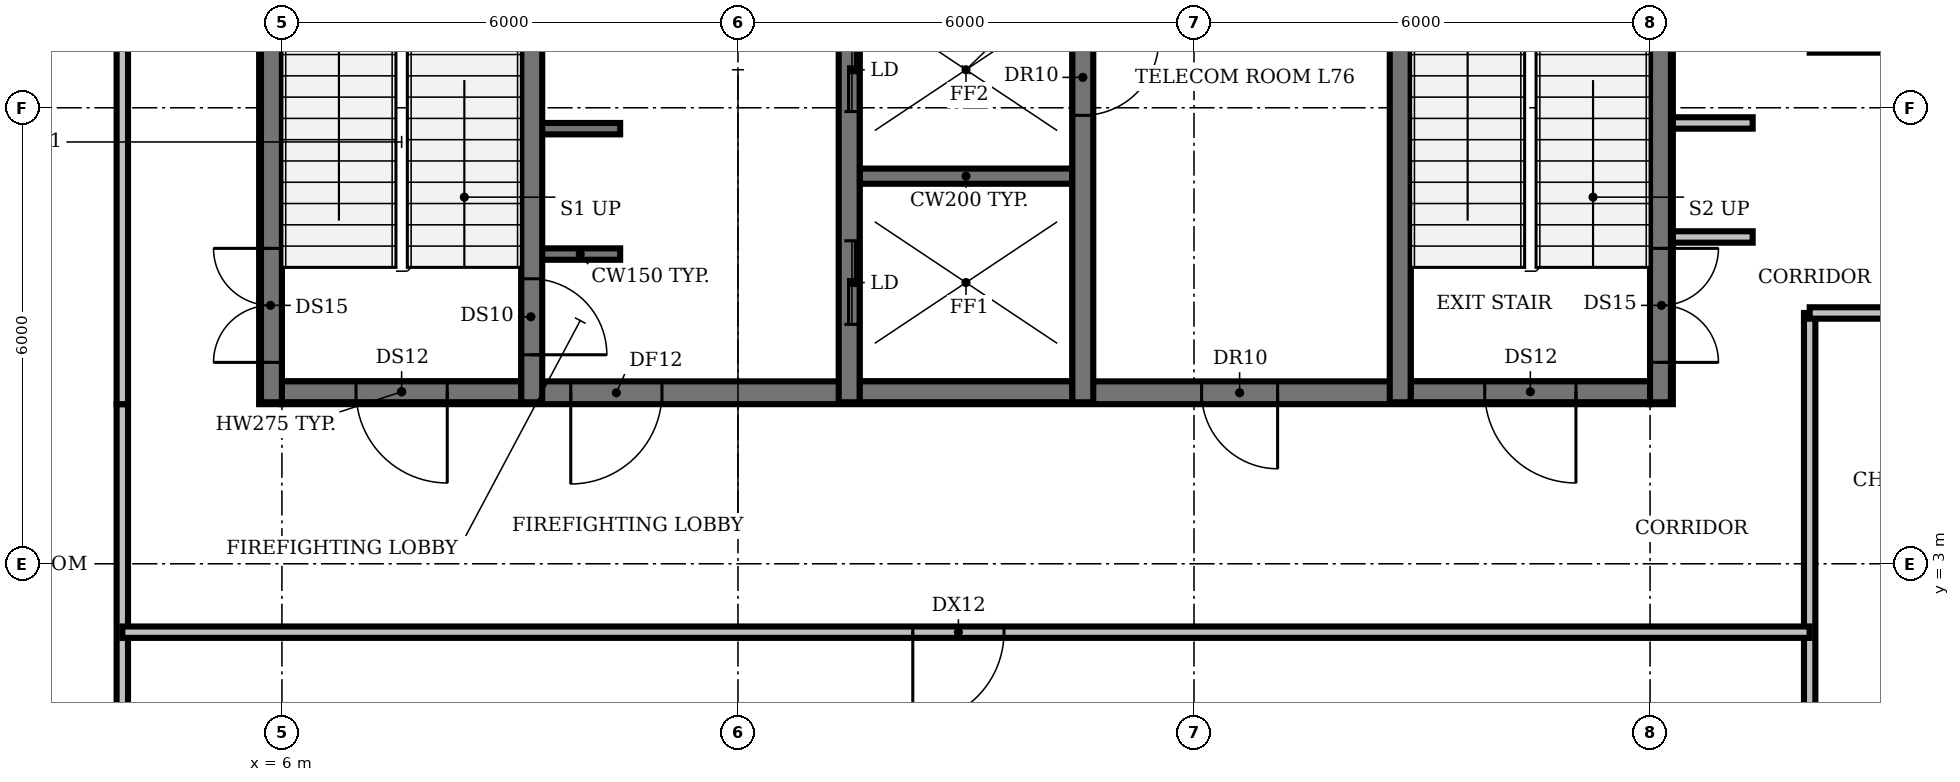
"""IFC4 building model, lengths in metres.
Left out: names, types, materials, properties, quantities, classifications, styles, units other than length and angle.
Written with IfcOpenShell. Run it as: python <this file> out.ifc"""

import sys

from ifc_helpers import new_model, si_unit, direction, frame, frame_2d, origin, place, context, subcontext, project, spatial, rectangle, extrude, element, fill, save


model = new_model("IFC4")
c1 = context("Model", 3, precision=1e-05, world=origin(), true_north=direction((0.0, 1.0)))
c2 = subcontext(c1, "Body", "Model", "MODEL_VIEW")
j1 = project(units=[si_unit("LENGTHUNIT", "METRE"), si_unit("PLANEANGLEUNIT", "RADIAN")], contexts=[c1])
p1 = place(None, origin())
s1 = spatial("IfcSite", under=j1, at=p1, CompositionType="ELEMENT")
p2 = place(p1, origin())
s2 = spatial("IfcBuilding", under=s1, at=p2, CompositionType="ELEMENT")
p3 = place(p2, frame((0.0, 0.0, 339.8)))
s3 = spatial("IfcBuildingStorey", under=s2, at=p3, CompositionType="ELEMENT", Elevation=339.8)
p4 = place(p3, frame((9.4, 7.075, 0.0), z_axis=(0.0, 0.0, 1.0), x_axis=(1.0, 0.0, 0.0)))
e1 = element("IfcWall", 1, at=p4, inside=s3, PredefinedType="SHEAR", context=c2, shape_type="SweptSolid", body=[
    extrude(rectangle(XDim=1.05, YDim=0.15, at=frame_2d((0.525, 0.0))), origin(), (0.0, 0.0, 1.0), 3.9),
])
p5 = place(p3, frame((13.6, 8.1, 0.0), z_axis=(0.0, 0.0, 1.0), x_axis=(1.0, 0.0, 0.0)))
e2 = element("IfcWall", 2, at=p5, inside=s3, PredefinedType="SHEAR", context=c2, shape_type="SweptSolid", body=[
    extrude(rectangle(XDim=2.8, YDim=0.2, at=frame_2d((1.4, 0.0))), origin(), (0.0, 0.0, 1.0), 3.9),
])
p6 = place(p3, frame((9.4, 8.725, 0.0), z_axis=(0.0, 0.0, 1.0), x_axis=(1.0, 0.0, 0.0)))
e3 = element("IfcWall", 3, at=p6, inside=s3, PredefinedType="SHEAR", context=c2, shape_type="SweptSolid", body=[
    extrude(rectangle(XDim=1.05, YDim=0.15, at=frame_2d((0.525, 0.0))), origin(), (0.0, 0.0, 1.0), 3.9),
])
p7 = place(p3, frame((9.275, 11.825, 0.0), z_axis=(0.0, 0.0, 1.0), x_axis=(0.0, -1.0, 0.0)))
e4 = element("IfcWall", 4, at=p7, inside=s3, PredefinedType="SHEAR", context=c2, shape_type="SweptSolid", body=[
    extrude(rectangle(XDim=6.425, YDim=0.25, at=frame_2d((3.212, 0.0))), origin(), (0.0, 0.0, 1.0), 3.9),
])
p8 = place(p7, frame((5.075, 0.0, 0.0)))
e5 = element("IfcOpeningElement", 5, at=p8, cuts=e4, PredefinedType="OPENING", context=c2, shape_type="SweptSolid", body=[
    extrude(rectangle(XDim=1.0, YDim=2.1, at=frame_2d((0.5, 1.05))), frame((0.0, 0.135, 0.0), z_axis=(0.0, -1.0, 0.0), x_axis=(1.0, 0.0, 0.0)), (0.0, 0.0, 1.0), 0.27),
])
p9 = place(p3, frame((13.5, 5.4, 0.0), z_axis=(0.0, 0.0, 1.0), x_axis=(0.0, 1.0, 0.0)))
e6 = element("IfcWall", 6, at=p9, inside=s3, PredefinedType="SHEAR", context=c2, shape_type="SweptSolid", body=[
    extrude(rectangle(XDim=8.2, YDim=0.2, at=frame_2d((4.1, 0.0))), origin(), (0.0, 0.0, 1.0), 3.9),
])
p10 = place(p9, frame((0.75, 0.0, 0.0)))
e7 = element("IfcOpeningElement", 7, at=p10, cuts=e6, PredefinedType="OPENING", context=c2, shape_type="SweptSolid", body=[
    extrude(rectangle(XDim=1.1, YDim=2.1, at=frame_2d((0.55, 1.05))), frame((0.0, 0.11, 0.0), z_axis=(0.0, -1.0, 0.0), x_axis=(1.0, 0.0, 0.0)), (0.0, 0.0, 1.0), 0.22),
])
p11 = place(p9, frame((3.55, 0.0, 0.0)))
e8 = element("IfcOpeningElement", 8, at=p11, cuts=e6, PredefinedType="OPENING", context=c2, shape_type="SweptSolid", body=[
    extrude(rectangle(XDim=1.1, YDim=2.1, at=frame_2d((0.55, 1.05))), frame((0.0, 0.11, 0.0), z_axis=(0.0, -1.0, 0.0), x_axis=(1.0, 0.0, 0.0)), (0.0, 0.0, 1.0), 0.22),
])
p12 = place(p9, frame((6.35, 0.0, 0.0)))
e9 = element("IfcOpeningElement", 9, at=p12, cuts=e6, PredefinedType="OPENING", context=c2, shape_type="SweptSolid", body=[
    extrude(rectangle(XDim=1.1, YDim=2.1, at=frame_2d((0.55, 1.05))), frame((0.0, 0.11, 0.0), z_axis=(0.0, -1.0, 0.0), x_axis=(1.0, 0.0, 0.0)), (0.0, 0.0, 1.0), 0.22),
])
p13 = place(p3, frame((16.5, 5.4, 0.0), z_axis=(0.0, 0.0, 1.0), x_axis=(0.0, 1.0, 0.0)))
e10 = element("IfcWall", 10, at=p13, inside=s3, PredefinedType="SHEAR", context=c2, shape_type="SweptSolid", body=[
    extrude(rectangle(XDim=8.2, YDim=0.2, at=frame_2d((4.1, 0.0))), origin(), (0.0, 0.0, 1.0), 3.9),
])
p14 = place(p3, frame((20.725, 5.4, 0.0), z_axis=(0.0, 0.0, 1.0), x_axis=(0.0, 1.0, 0.0)))
e11 = element("IfcWall", 11, at=p14, inside=s3, PredefinedType="SHEAR", context=c2, shape_type="SweptSolid", body=[
    extrude(rectangle(XDim=6.3, YDim=0.25, at=frame_2d((3.15, 0.0))), origin(), (0.0, 0.0, 1.0), 3.9),
])
p15 = place(p3, frame((5.85, 5.1, 0.0), z_axis=(0.0, 0.0, 1.0), x_axis=(0.0, 1.0, 0.0)))
e12 = element("IfcWall", 12, at=p15, inside=s3, PredefinedType="SHEAR", context=c2, shape_type="SweptSolid", body=[
    extrude(rectangle(XDim=20.0, YDim=0.3, at=frame_2d((10.0, 0.0))), origin(), (0.0, 0.0, 1.0), 3.9),
])
p16 = place(p15, frame((0.55, 0.0, 0.0)))
e13 = element("IfcOpeningElement", 13, at=p16, cuts=e12, PredefinedType="OPENING", context=c2, shape_type="SweptSolid", body=[
    extrude(rectangle(XDim=1.5, YDim=2.1, at=frame_2d((0.75, 1.05))), frame((0.0, 0.16, 0.0), z_axis=(0.0, -1.0, 0.0), x_axis=(1.0, 0.0, 0.0)), (0.0, 0.0, 1.0), 0.32),
])
p17 = place(p15, frame((7.0, 0.0, 0.0)))
e14 = element("IfcOpeningElement", 14, at=p17, cuts=e12, PredefinedType="OPENING", context=c2, shape_type="SweptSolid", body=[
    extrude(rectangle(XDim=1.2, YDim=2.1, at=frame_2d((0.6, 1.05))), frame((0.0, 0.16, 0.0), z_axis=(0.0, -1.0, 0.0), x_axis=(1.0, 0.0, 0.0)), (0.0, 0.0, 1.0), 0.32),
])
p18 = place(p15, frame((13.55, 0.0, 0.0)))
e15 = element("IfcOpeningElement", 15, at=p18, cuts=e12, PredefinedType="OPENING", context=c2, shape_type="SweptSolid", body=[
    extrude(rectangle(XDim=1.2, YDim=2.1, at=frame_2d((0.6, 1.05))), frame((0.0, 0.16, 0.0), z_axis=(0.0, -1.0, 0.0), x_axis=(1.0, 0.0, 0.0)), (0.0, 0.0, 1.0), 0.32),
])
p19 = place(p3, frame((24.15, 25.705, 0.0), z_axis=(0.0, 0.0, 1.0), x_axis=(0.0, -1.0, 0.0)))
e16 = element("IfcWall", 16, at=p19, inside=s3, PredefinedType="SHEAR", context=c2, shape_type="SweptSolid", body=[
    extrude(rectangle(XDim=20.605, YDim=0.3, at=frame_2d((10.302, 0.0))), origin(), (0.0, 0.0, 1.0), 3.9),
])
p20 = place(p19, frame((18.555, 0.0, 0.0)))
e17 = element("IfcOpeningElement", 17, at=p20, cuts=e16, PredefinedType="OPENING", context=c2, shape_type="SweptSolid", body=[
    extrude(rectangle(XDim=1.5, YDim=2.1, at=frame_2d((0.75, 1.05))), frame((0.0, 0.16, 0.0), z_axis=(0.0, -1.0, 0.0), x_axis=(1.0, 0.0, 0.0)), (0.0, 0.0, 1.0), 0.32),
])
p21 = place(p19, frame((12.455, 0.0, 0.0)))
e18 = element("IfcOpeningElement", 18, at=p21, cuts=e16, PredefinedType="OPENING", context=c2, shape_type="SweptSolid", body=[
    extrude(rectangle(XDim=0.9, YDim=2.1, at=frame_2d((0.45, 1.05))), frame((0.0, 0.16, 0.0), z_axis=(0.0, -1.0, 0.0), x_axis=(1.0, 0.0, 0.0)), (0.0, 0.0, 1.0), 0.32),
])
p22 = place(p19, frame((6.455, 0.0, 0.0)))
e19 = element("IfcOpeningElement", 19, at=p22, cuts=e16, PredefinedType="OPENING", context=c2, shape_type="SweptSolid", body=[
    extrude(rectangle(XDim=2.0, YDim=2.1, at=frame_2d((1.0, 1.05))), frame((0.0, 0.16, 0.0), z_axis=(0.0, -1.0, 0.0), x_axis=(1.0, 0.0, 0.0)), (0.0, 0.0, 1.0), 0.32),
])
p23 = place(p3, frame((24.0, 5.25, 0.0), z_axis=(0.0, 0.0, 1.0), x_axis=(-1.0, 0.0, 0.0)))
e20 = element("IfcWall", 20, at=p23, inside=s3, PredefinedType="SHEAR", context=c2, shape_type="SweptSolid", body=[
    extrude(rectangle(XDim=18.0, YDim=0.3, at=frame_2d((9.0, 0.0))), origin(), (0.0, 0.0, 1.0), 3.9),
])
p24 = place(p23, frame((13.0, 0.0, 0.0)))
e21 = element("IfcOpeningElement", 21, at=p24, cuts=e20, PredefinedType="OPENING", context=c2, shape_type="SweptSolid", body=[
    extrude(rectangle(XDim=1.2, YDim=2.1, at=frame_2d((0.6, 1.05))), frame((0.0, 0.16, 0.0), z_axis=(0.0, -1.0, 0.0), x_axis=(1.0, 0.0, 0.0)), (0.0, 0.0, 1.0), 0.32),
])
p25 = place(p23, frame((4.9, 0.0, 0.0)))
e22 = element("IfcOpeningElement", 22, at=p25, cuts=e20, PredefinedType="OPENING", context=c2, shape_type="SweptSolid", body=[
    extrude(rectangle(XDim=1.0, YDim=2.1, at=frame_2d((0.5, 1.05))), frame((0.0, 0.16, 0.0), z_axis=(0.0, -1.0, 0.0), x_axis=(1.0, 0.0, 0.0)), (0.0, 0.0, 1.0), 0.32),
])
p26 = place(p3, frame((9.15, 5.263, 4.2), z_axis=(0.0, 0.0, 1.0), x_axis=(-1.0, 0.0, 0.0)))
e23 = element("IfcWall", 23, at=p26, inside=s3, PredefinedType="SHEAR", context=c2, shape_type="SweptSolid", body=[
    extrude(rectangle(XDim=3.15, YDim=0.275, at=frame_2d((1.575, 0.0))), origin(), (0.0, 0.0, 1.0), 3.0),
])
p27 = place(p26, frame((0.975, 0.0, 0.0)))
e24 = element("IfcOpeningElement", 24, at=p27, cuts=e23, PredefinedType="OPENING", context=c2, shape_type="SweptSolid", body=[
    extrude(rectangle(XDim=1.2, YDim=2.1, at=frame_2d((0.6, 1.05))), frame((0.0, 0.147, 0.0), z_axis=(0.0, -1.0, 0.0), x_axis=(1.0, 0.0, 0.0)), (0.0, 0.0, 1.0), 0.295),
])
p28 = place(p3, frame((13.6, 5.263, 4.2), z_axis=(0.0, 0.0, 1.0), x_axis=(1.0, 0.0, 0.0)))
e25 = element("IfcWall", 25, at=p28, inside=s3, PredefinedType="SHEAR", context=c2, shape_type="SweptSolid", body=[
    extrude(rectangle(XDim=2.8, YDim=0.275, at=frame_2d((1.4, 0.0))), origin(), (0.0, 0.0, 1.0), 3.0),
])
p29 = place(p3, frame((24.0, 5.263, 4.2), z_axis=(0.0, 0.0, 1.0), x_axis=(-1.0, 0.0, 0.0)))
e26 = element("IfcWall", 26, at=p29, inside=s3, PredefinedType="SHEAR", context=c2, shape_type="SweptSolid", body=[
    extrude(rectangle(XDim=3.15, YDim=0.275, at=frame_2d((1.575, 0.0))), origin(), (0.0, 0.0, 1.0), 3.0),
])
p30 = place(p29, frame((0.975, 0.0, 0.0)))
e27 = element("IfcOpeningElement", 27, at=p30, cuts=e26, PredefinedType="OPENING", context=c2, shape_type="SweptSolid", body=[
    extrude(rectangle(XDim=1.2, YDim=2.1, at=frame_2d((0.6, 1.05))), frame((0.0, 0.147, 0.0), z_axis=(0.0, -1.0, 0.0), x_axis=(1.0, 0.0, 0.0)), (0.0, 0.0, 1.0), 0.295),
])
p31 = place(p3, frame((5.862, 5.125, 4.2), z_axis=(0.0, 0.0, 1.0), x_axis=(0.0, 1.0, 0.0)))
e28 = element("IfcWall", 28, at=p31, inside=s3, PredefinedType="SHEAR", context=c2, shape_type="SweptSolid", body=[
    extrude(rectangle(XDim=19.95, YDim=0.275, at=frame_2d((9.975, 0.0))), origin(), (0.0, 0.0, 1.0), 3.0),
])
p32 = place(p31, frame((6.975, 0.0, 0.0)))
e29 = element("IfcOpeningElement", 29, at=p32, cuts=e28, PredefinedType="OPENING", context=c2, shape_type="SweptSolid", body=[
    extrude(rectangle(XDim=1.2, YDim=2.1, at=frame_2d((0.6, 1.05))), frame((0.0, 0.147, 0.0), z_axis=(0.0, -1.0, 0.0), x_axis=(1.0, 0.0, 0.0)), (0.0, 0.0, 1.0), 0.295),
])
p33 = place(p31, frame((13.525, 0.0, 0.0)))
e30 = element("IfcOpeningElement", 30, at=p33, cuts=e28, PredefinedType="OPENING", context=c2, shape_type="SweptSolid", body=[
    extrude(rectangle(XDim=1.2, YDim=2.1, at=frame_2d((0.6, 1.05))), frame((0.0, 0.147, 0.0), z_axis=(0.0, -1.0, 0.0), x_axis=(1.0, 0.0, 0.0)), (0.0, 0.0, 1.0), 0.295),
])
p34 = place(p3, frame((9.287, 5.125, 4.2), z_axis=(0.0, 0.0, 1.0), x_axis=(0.0, 1.0, 0.0)))
e31 = element("IfcWall", 31, at=p34, inside=s3, PredefinedType="SHEAR", context=c2, shape_type="SweptSolid", body=[
    extrude(rectangle(XDim=19.95, YDim=0.275, at=frame_2d((9.975, 0.0))), origin(), (0.0, 0.0, 1.0), 3.0),
])
p35 = place(p3, frame((13.463, 5.125, 4.2), z_axis=(0.0, 0.0, 1.0), x_axis=(0.0, 1.0, 0.0)))
e32 = element("IfcWall", 32, at=p35, inside=s3, PredefinedType="SHEAR", context=c2, shape_type="SweptSolid", body=[
    extrude(rectangle(XDim=8.75, YDim=0.275, at=frame_2d((4.375, 0.0))), origin(), (0.0, 0.0, 1.0), 3.0),
])
p36 = place(p3, frame((16.537, 13.875, 4.2), z_axis=(0.0, 0.0, 1.0), x_axis=(0.0, -1.0, 0.0)))
e33 = element("IfcWall", 33, at=p36, inside=s3, PredefinedType="SHEAR", context=c2, shape_type="SweptSolid", body=[
    extrude(rectangle(XDim=8.75, YDim=0.275, at=frame_2d((4.375, 0.0))), origin(), (0.0, 0.0, 1.0), 3.0),
])
p37 = place(p36, frame((3.975, 0.0, 0.0)))
e34 = element("IfcOpeningElement", 34, at=p37, cuts=e33, PredefinedType="OPENING", context=c2, shape_type="SweptSolid", body=[
    extrude(rectangle(XDim=1.0, YDim=2.1, at=frame_2d((0.5, 1.05))), frame((0.0, 0.147, 0.0), z_axis=(0.0, -1.0, 0.0), x_axis=(1.0, 0.0, 0.0)), (0.0, 0.0, 1.0), 0.295),
])
for number, where, z_axis, x_axis in (
    (35, (20.713, 5.125, 4.2), (0.0, 0.0, 1.0), (0.0, 1.0, 0.0)),
    (36, (24.137, 5.125, 4.2), (0.0, 0.0, 1.0), (0.0, 1.0, 0.0)),
):
    element("IfcWall", number, at=place(p3, frame(where, z_axis=z_axis, x_axis=x_axis)), inside=s3, PredefinedType="SHEAR", context=c2, shape_type="SweptSolid", body=[
        extrude(rectangle(XDim=6.85, YDim=0.275, at=frame_2d((3.425, 0.0))), origin(), (0.0, 0.0, 1.0), 3.0),
    ])
p38 = place(p3, frame((3.9, -3.56, 0.0), z_axis=(0.0, 0.0, 1.0), x_axis=(0.0, 1.0, 0.0)))
e37 = element("IfcWall", 37, at=p38, inside=s3, PredefinedType="PARTITIONING", context=c2, shape_type="SweptSolid", body=[
    extrude(rectangle(XDim=8.66, YDim=0.15, at=frame_2d((4.33, 0.0))), origin(), (0.0, 0.0, 1.0), 2.95),
])
p39 = place(p3, frame((3.9, 5.1, 0.0), z_axis=(0.0, 0.0, 1.0), x_axis=(0.0, 1.0, 0.0)))
e38 = element("IfcWall", 38, at=p39, inside=s3, PredefinedType="PARTITIONING", context=c2, shape_type="SweptSolid", body=[
    extrude(rectangle(XDim=13.9, YDim=0.15, at=frame_2d((6.95, 0.0))), origin(), (0.0, 0.0, 1.0), 2.95),
])
p40 = place(p39, frame((6.2, 0.0, 0.0)))
e39 = element("IfcOpeningElement", 39, at=p40, cuts=e38, PredefinedType="OPENING", context=c2, shape_type="SweptSolid", body=[
    extrude(rectangle(XDim=1.2, YDim=2.1, at=frame_2d((0.6, 1.05))), frame((0.0, 0.085, 0.0), z_axis=(0.0, -1.0, 0.0), x_axis=(1.0, 0.0, 0.0)), (0.0, 0.0, 1.0), 0.17),
])
for number, where, z_axis, x_axis in (
    (40, (24.3, 7.3, 0.0), (0.0, 0.0, 1.0), (1.0, 0.0, 0.0)),
    (41, (24.3, 8.8, 0.0), (0.0, 0.0, 1.0), (1.0, 0.0, 0.0)),
):
    element("IfcWall", number, at=place(p3, frame(where, z_axis=z_axis, x_axis=x_axis)), inside=s3, PredefinedType="PARTITIONING", context=c2, shape_type="SweptSolid", body=[
        extrude(rectangle(XDim=1.05, YDim=0.15, at=frame_2d((0.525, 0.0))), origin(), (0.0, 0.0, 1.0), 2.95),
    ])
p41 = place(p3, frame((26.1, -3.29, 0.0), z_axis=(0.0, 0.0, 1.0), x_axis=(0.0, 1.0, 0.0)))
e42 = element("IfcWall", 42, at=p41, inside=s3, PredefinedType="PARTITIONING", context=c2, shape_type="SweptSolid", body=[
    extrude(rectangle(XDim=9.59, YDim=0.15, at=frame_2d((4.795, 0.0))), origin(), (0.0, 0.0, 1.0), 2.95),
])
p42 = place(p3, frame((26.1, 2.1, 0.0), z_axis=(0.0, 0.0, 1.0), x_axis=(-1.0, 0.0, 0.0)))
e43 = element("IfcWall", 43, at=p42, inside=s3, PredefinedType="PARTITIONING", context=c2, shape_type="SweptSolid", body=[
    extrude(rectangle(XDim=22.2, YDim=0.15, at=frame_2d((11.1, 0.0))), origin(), (0.0, 0.0, 1.0), 2.95),
])
p43 = place(p42, frame((10.6, 0.0, 0.0)))
e44 = element("IfcOpeningElement", 44, at=p43, cuts=e43, PredefinedType="OPENING", context=c2, shape_type="SweptSolid", body=[
    extrude(rectangle(XDim=1.2, YDim=2.1, at=frame_2d((0.6, 1.05))), frame((0.0, 0.085, 0.0), z_axis=(0.0, -1.0, 0.0), x_axis=(1.0, 0.0, 0.0)), (0.0, 0.0, 1.0), 0.17),
])
for number, where, z_axis, x_axis in (
    (45, (26.1, 6.3, 0.0), (0.0, 0.0, 1.0), (1.0, 0.0, 0.0)),
    (46, (26.1, 9.8, 0.0), (0.0, 0.0, 1.0), (1.0, 0.0, 0.0)),
):
    element("IfcWall", number, at=place(p3, frame(where, z_axis=z_axis, x_axis=x_axis)), inside=s3, PredefinedType="PARTITIONING", context=c2, shape_type="SweptSolid", body=[
        extrude(rectangle(XDim=1.11, YDim=0.15, at=frame_2d((0.555, 0.0))), origin(), (0.0, 0.0, 1.0), 2.95),
    ])
p44 = place(p8, origin())
e47 = element("IfcDoor", 47, at=p44, inside=s3, OperationType="SINGLE_SWING_RIGHT", PredefinedType="DOOR", context=c2, shape_type="SweptSolid", body=[
    extrude(rectangle(XDim=1.0, YDim=2.1, at=frame_2d((0.5, 1.05))), frame((0.0, 0.025, 0.0), z_axis=(0.0, -1.0, 0.0), x_axis=(1.0, 0.0, 0.0)), (0.0, 0.0, 1.0), 0.05),
])
fill(e5, e47)
p45 = place(p10, origin())
e48 = element("IfcDoor", 48, at=p45, inside=s3, OperationType="DOUBLE_DOOR_SLIDING", PredefinedType="DOOR", context=c2, shape_type="SweptSolid", body=[
    extrude(rectangle(XDim=1.1, YDim=2.1, at=frame_2d((0.55, 1.05))), frame((0.0, 0.025, 0.0), z_axis=(0.0, -1.0, 0.0), x_axis=(1.0, 0.0, 0.0)), (0.0, 0.0, 1.0), 0.05),
])
fill(e7, e48)
p46 = place(p11, origin())
e49 = element("IfcDoor", 49, at=p46, inside=s3, OperationType="DOUBLE_DOOR_SLIDING", PredefinedType="DOOR", context=c2, shape_type="SweptSolid", body=[
    extrude(rectangle(XDim=1.1, YDim=2.1, at=frame_2d((0.55, 1.05))), frame((0.0, 0.025, 0.0), z_axis=(0.0, -1.0, 0.0), x_axis=(1.0, 0.0, 0.0)), (0.0, 0.0, 1.0), 0.05),
])
fill(e8, e49)
p47 = place(p16, origin())
e50 = element("IfcDoor", 50, at=p47, inside=s3, OperationType="DOUBLE_DOOR_SINGLE_SWING", PredefinedType="DOOR", context=c2, shape_type="SweptSolid", body=[
    extrude(rectangle(XDim=1.5, YDim=2.1, at=frame_2d((0.75, 1.05))), frame((0.0, 0.025, 0.0), z_axis=(0.0, -1.0, 0.0), x_axis=(1.0, 0.0, 0.0)), (0.0, 0.0, 1.0), 0.05),
])
fill(e13, e50)
p48 = place(p20, origin())
e51 = element("IfcDoor", 51, at=p48, inside=s3, OperationType="DOUBLE_DOOR_SINGLE_SWING", PredefinedType="DOOR", context=c2, shape_type="SweptSolid", body=[
    extrude(rectangle(XDim=1.5, YDim=2.1, at=frame_2d((0.75, 1.05))), frame((0.0, 0.025, 0.0), z_axis=(0.0, -1.0, 0.0), x_axis=(1.0, 0.0, 0.0)), (0.0, 0.0, 1.0), 0.05),
])
fill(e17, e51)
p49 = place(p24, origin())
e52 = element("IfcDoor", 52, at=p49, inside=s3, OperationType="SINGLE_SWING_RIGHT", PredefinedType="DOOR", context=c2, shape_type="SweptSolid", body=[
    extrude(rectangle(XDim=1.2, YDim=2.1, at=frame_2d((0.6, 1.05))), frame((0.0, 0.025, 0.0), z_axis=(0.0, -1.0, 0.0), x_axis=(1.0, 0.0, 0.0)), (0.0, 0.0, 1.0), 0.05),
])
fill(e21, e52)
p50 = place(p25, origin())
e53 = element("IfcDoor", 53, at=p50, inside=s3, OperationType="SINGLE_SWING_LEFT", PredefinedType="DOOR", context=c2, shape_type="SweptSolid", body=[
    extrude(rectangle(XDim=1.0, YDim=2.1, at=frame_2d((0.5, 1.05))), frame((0.0, 0.025, 0.0), z_axis=(0.0, -1.0, 0.0), x_axis=(1.0, 0.0, 0.0)), (0.0, 0.0, 1.0), 0.05),
])
fill(e22, e53)
p51 = place(p27, origin())
e54 = element("IfcDoor", 54, at=p51, inside=s3, OperationType="SINGLE_SWING_LEFT", PredefinedType="DOOR", context=c2, shape_type="SweptSolid", body=[
    extrude(rectangle(XDim=1.2, YDim=2.1, at=frame_2d((0.6, 1.05))), frame((0.0, 0.025, 0.0), z_axis=(0.0, -1.0, 0.0), x_axis=(1.0, 0.0, 0.0)), (0.0, 0.0, 1.0), 0.05),
])
fill(e24, e54)
p52 = place(p30, origin())
e55 = element("IfcDoor", 55, at=p52, inside=s3, OperationType="SINGLE_SWING_LEFT", PredefinedType="DOOR", context=c2, shape_type="SweptSolid", body=[
    extrude(rectangle(XDim=1.2, YDim=2.1, at=frame_2d((0.6, 1.05))), frame((0.0, 0.025, 0.0), z_axis=(0.0, -1.0, 0.0), x_axis=(1.0, 0.0, 0.0)), (0.0, 0.0, 1.0), 0.05),
])
fill(e27, e55)
p53 = place(p37, origin())
e56 = element("IfcDoor", 56, at=p53, inside=s3, OperationType="SINGLE_SWING_LEFT", PredefinedType="DOOR", context=c2, shape_type="SweptSolid", body=[
    extrude(rectangle(XDim=1.0, YDim=2.1, at=frame_2d((0.5, 1.05))), frame((0.0, 0.025, 0.0), z_axis=(0.0, -1.0, 0.0), x_axis=(1.0, 0.0, 0.0)), (0.0, 0.0, 1.0), 0.05),
])
fill(e34, e56)
p54 = place(p43, origin())
e57 = element("IfcDoor", 57, at=p54, inside=s3, OperationType="SINGLE_SWING_RIGHT", PredefinedType="DOOR", context=c2, shape_type="SweptSolid", body=[
    extrude(rectangle(XDim=1.2, YDim=2.1, at=frame_2d((0.6, 1.05))), frame((0.0, 0.025, 0.0), z_axis=(0.0, -1.0, 0.0), x_axis=(1.0, 0.0, 0.0)), (0.0, 0.0, 1.0), 0.05),
])
fill(e44, e57)
save(model, sys.argv[1])
